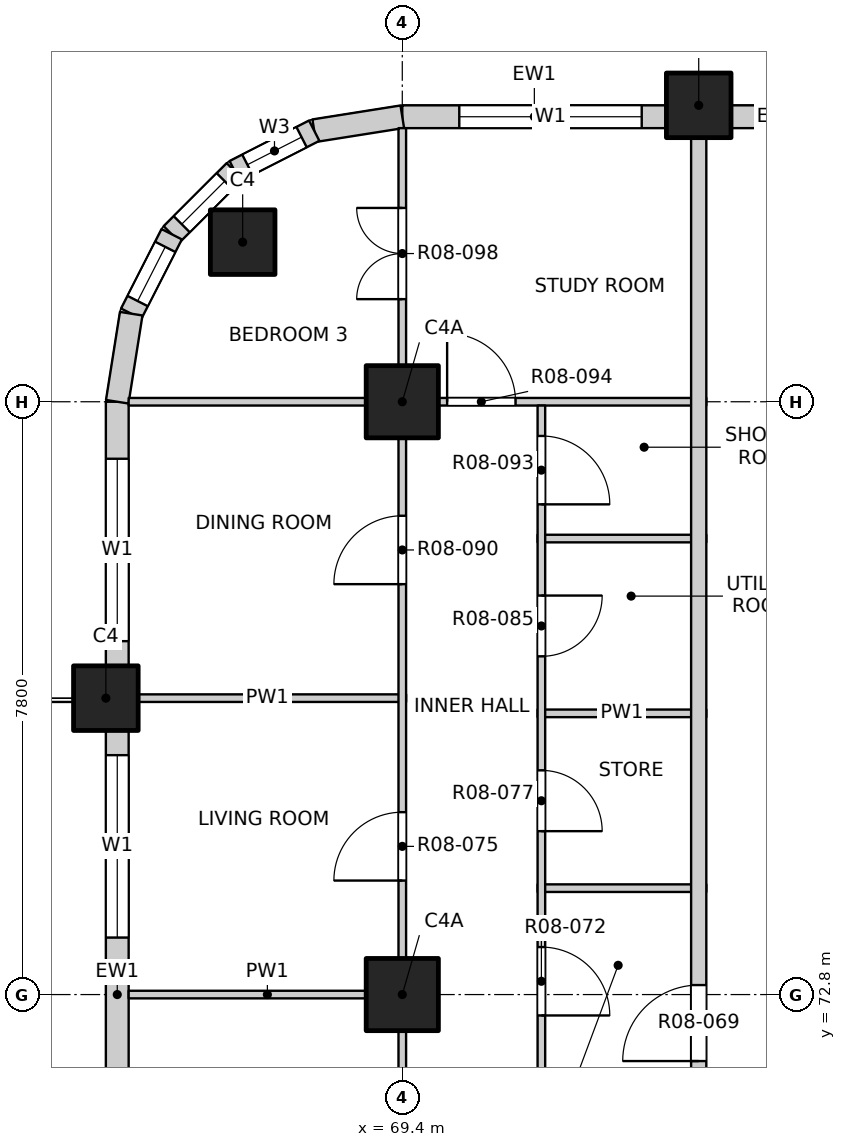
"""IFC4 building model, lengths in metres.
Left out: names, types, materials, properties, quantities, classifications, styles, units other than length and angle.
Written with IfcOpenShell. Run it as: python <this file> out.ifc"""

import sys

from ifc_helpers import new_model, si_unit, direction, frame, frame_2d, origin, origin_2d, place, context, subcontext, project, spatial, rectangle, extrude, element, fill, save


model = new_model("IFC4")
c1 = context("Model", 3, precision=1e-05, world=origin(), true_north=direction((0.0, 1.0)))
c2 = subcontext(c1, "Body", "Model", "MODEL_VIEW")
j1 = project(units=[si_unit("LENGTHUNIT", "METRE"), si_unit("PLANEANGLEUNIT", "RADIAN")], contexts=[c1])
p1 = place(None, origin())
s1 = spatial("IfcSite", under=j1, at=p1, CompositionType="ELEMENT")
p2 = place(p1, origin())
s2 = spatial("IfcBuilding", under=s1, at=p2, CompositionType="ELEMENT")
p3 = place(p2, frame((0.0, 0.0, 99.9)))
s3 = spatial("IfcBuildingStorey", under=s2, at=p3, CompositionType="ELEMENT", Elevation=99.9)
for number, where, z_axis, x_axis in (
    (1, (67.3, 82.7, -0.3), (0.0, 0.0, 1.0), (1.0, 0.0, 0.0)),
    (2, (73.3, 84.5, -0.3), (0.0, 0.0, 1.0), (1.0, 0.0, 0.0)),
    (3, (65.5, 76.7, -0.3), (0.0, 0.0, 1.0), (1.0, 0.0, 0.0)),
):
    element("IfcColumn", number, at=place(p3, frame(where, z_axis=z_axis, x_axis=x_axis)), inside=s3, PredefinedType="COLUMN", context=c2, shape_type="SweptSolid", body=[
        extrude(rectangle(XDim=0.85, YDim=0.85, at=origin_2d()), origin(), (0.0, 0.0, 1.0), 3.45),
    ])
for number, where, z_axis, x_axis in (
    (4, (69.4, 72.8, -0.3), (0.0, 0.0, 1.0), (1.0, 0.0, 0.0)),
    (5, (69.4, 80.6, -0.3), (0.0, 0.0, 1.0), (1.0, 0.0, 0.0)),
):
    element("IfcColumn", number, at=place(p3, frame(where, z_axis=z_axis, x_axis=x_axis)), inside=s3, PredefinedType="COLUMN", context=c2, shape_type="SweptSolid", body=[
        extrude(rectangle(XDim=0.95, YDim=0.95, at=origin_2d()), origin(), (0.0, 0.0, 1.0), 3.45),
    ])
p4 = place(p3, frame((69.4, 84.35, 0.0), z_axis=(0.0, 0.0, 1.0), x_axis=(1.0, 0.0, 0.0)))
e6 = element("IfcWall", 6, at=p4, inside=s3, PredefinedType="SOLIDWALL", context=c2, shape_type="SweptSolid", body=[
    extrude(rectangle(XDim=3.475, YDim=0.3, at=frame_2d((1.738, 0.0))), origin(), (0.0, 0.0, 1.0), 2.7),
])
p5 = place(p4, frame((0.75, 0.0, 0.9)))
e7 = element("IfcOpeningElement", 7, at=p5, cuts=e6, PredefinedType="OPENING", context=c2, shape_type="SweptSolid", body=[
    extrude(rectangle(XDim=2.4, YDim=1.8, at=frame_2d((1.2, 0.9))), frame((0.0, 0.16, 0.0), z_axis=(0.0, -1.0, 0.0), x_axis=(1.0, 0.0, 0.0)), (0.0, 0.0, 1.0), 0.32),
])
p6 = place(p3, frame((73.725, 84.35, 0.0), z_axis=(0.0, 0.0, 1.0), x_axis=(1.0, 0.0, 0.0)))
e8 = element("IfcWall", 8, at=p6, inside=s3, PredefinedType="SOLIDWALL", context=c2, shape_type="SweptSolid", body=[
    extrude(rectangle(XDim=1.25, YDim=0.3, at=frame_2d((0.625, 0.0))), origin(), (0.0, 0.0, 1.0), 2.7),
])
p7 = place(p3, frame((65.65, 69.325, 0.0), z_axis=(0.0, 0.0, 1.0), x_axis=(0.0, 1.0, 0.0)))
e9 = element("IfcWall", 9, at=p7, inside=s3, PredefinedType="SOLIDWALL", context=c2, shape_type="SweptSolid", body=[
    extrude(rectangle(XDim=6.95, YDim=0.3, at=frame_2d((3.475, 0.0))), origin(), (0.0, 0.0, 1.0), 2.7),
])
p8 = place(p7, frame((0.625, 0.0, 0.0)))
e10 = element("IfcOpeningElement", 10, at=p8, cuts=e9, PredefinedType="OPENING", context=c2, shape_type="SweptSolid", body=[
    extrude(rectangle(XDim=1.8, YDim=2.4, at=frame_2d((0.9, 1.2))), frame((0.0, 0.16, 0.0), z_axis=(0.0, -1.0, 0.0), x_axis=(1.0, 0.0, 0.0)), (0.0, 0.0, 1.0), 0.32),
])
p9 = place(p7, frame((4.225, 0.0, 0.9)))
e11 = element("IfcOpeningElement", 11, at=p9, cuts=e9, PredefinedType="OPENING", context=c2, shape_type="SweptSolid", body=[
    extrude(rectangle(XDim=2.4, YDim=1.8, at=frame_2d((1.2, 0.9))), frame((0.0, 0.16, 0.0), z_axis=(0.0, -1.0, 0.0), x_axis=(1.0, 0.0, 0.0)), (0.0, 0.0, 1.0), 0.32),
])
p10 = place(p3, frame((65.65, 77.125, 0.0), z_axis=(0.0, 0.0, 1.0), x_axis=(0.0, 1.0, 0.0)))
e12 = element("IfcWall", 12, at=p10, inside=s3, PredefinedType="SOLIDWALL", context=c2, shape_type="SweptSolid", body=[
    extrude(rectangle(XDim=3.475, YDim=0.3, at=frame_2d((1.738, 0.0))), origin(), (0.0, 0.0, 1.0), 2.7),
])
p11 = place(p10, frame((0.325, 0.0, 0.9)))
e13 = element("IfcOpeningElement", 13, at=p11, cuts=e12, PredefinedType="OPENING", context=c2, shape_type="SweptSolid", body=[
    extrude(rectangle(XDim=2.4, YDim=1.8, at=frame_2d((1.2, 0.9))), frame((0.0, 0.16, 0.0), z_axis=(0.0, -1.0, 0.0), x_axis=(1.0, 0.0, 0.0)), (0.0, 0.0, 1.0), 0.32),
])
p12 = place(p3, frame((69.4, 84.35, 0.0), z_axis=(0.0, 0.0, 1.0), x_axis=(-0.987678452879, -0.156496880861, 0.0)))
e14 = element("IfcWall", 14, at=p12, inside=s3, PredefinedType="SOLIDWALL", context=c2, shape_type="SweptSolid", body=[
    extrude(rectangle(XDim=1.173, YDim=0.3, at=frame_2d((0.586, 0.0))), origin(), (0.0, 0.0, 1.0), 2.7),
])
p13 = place(p3, frame((68.241, 84.167, 0.0), z_axis=(0.0, 0.0, 1.0), x_axis=(-0.890988677504, -0.454025524128, 0.0)))
e15 = element("IfcWall", 15, at=p13, inside=s3, PredefinedType="SOLIDWALL", context=c2, shape_type="SweptSolid", body=[
    extrude(rectangle(XDim=1.173, YDim=0.3, at=frame_2d((0.587, 0.0))), origin(), (0.0, 0.0, 1.0), 2.7),
])
p14 = place(p13, frame((0.187, 0.0, 0.9)))
e16 = element("IfcOpeningElement", 16, at=p14, cuts=e15, PredefinedType="OPENING", context=c2, shape_type="SweptSolid", body=[
    extrude(rectangle(XDim=0.8, YDim=1.2, at=frame_2d((0.4, 0.6))), frame((0.0, 0.16, 0.0), z_axis=(0.0, -1.0, 0.0), x_axis=(1.0, 0.0, 0.0)), (0.0, 0.0, 1.0), 0.32),
])
p15 = place(p3, frame((67.196, 83.634, 0.0), z_axis=(0.0, 0.0, 1.0), x_axis=(-0.707106781187, -0.707106781187, 0.0)))
e17 = element("IfcWall", 17, at=p15, inside=s3, PredefinedType="SOLIDWALL", context=c2, shape_type="SweptSolid", body=[
    extrude(rectangle(XDim=1.173, YDim=0.3, at=frame_2d((0.586, 0.0))), origin(), (0.0, 0.0, 1.0), 2.7),
])
p16 = place(p15, frame((0.187, 0.0, 0.9)))
e18 = element("IfcOpeningElement", 18, at=p16, cuts=e17, PredefinedType="OPENING", context=c2, shape_type="SweptSolid", body=[
    extrude(rectangle(XDim=0.8, YDim=1.2, at=frame_2d((0.4, 0.6))), frame((0.0, 0.16, 0.0), z_axis=(0.0, -1.0, 0.0), x_axis=(1.0, 0.0, 0.0)), (0.0, 0.0, 1.0), 0.32),
])
p17 = place(p3, frame((66.366, 82.804, 0.0), z_axis=(0.0, 0.0, 1.0), x_axis=(-0.454025524128, -0.890988677504, 0.0)))
e19 = element("IfcWall", 19, at=p17, inside=s3, PredefinedType="SOLIDWALL", context=c2, shape_type="SweptSolid", body=[
    extrude(rectangle(XDim=1.173, YDim=0.3, at=frame_2d((0.587, 0.0))), origin(), (0.0, 0.0, 1.0), 2.7),
])
p18 = place(p17, frame((0.187, 0.0, 0.9)))
e20 = element("IfcOpeningElement", 20, at=p18, cuts=e19, PredefinedType="OPENING", context=c2, shape_type="SweptSolid", body=[
    extrude(rectangle(XDim=0.8, YDim=1.2, at=frame_2d((0.4, 0.6))), frame((0.0, 0.16, 0.0), z_axis=(0.0, -1.0, 0.0), x_axis=(1.0, 0.0, 0.0)), (0.0, 0.0, 1.0), 0.32),
])
p19 = place(p3, frame((65.833, 81.759, 0.0), z_axis=(0.0, 0.0, 1.0), x_axis=(-0.156496880861, -0.987678452879, 0.0)))
e21 = element("IfcWall", 21, at=p19, inside=s3, PredefinedType="SOLIDWALL", context=c2, shape_type="SweptSolid", body=[
    extrude(rectangle(XDim=1.173, YDim=0.3, at=frame_2d((0.586, 0.0))), origin(), (0.0, 0.0, 1.0), 2.7),
])
p20 = place(p3, frame((65.8, 72.8, 0.0), z_axis=(0.0, 0.0, 1.0), x_axis=(1.0, 0.0, 0.0)))
e22 = element("IfcWall", 22, at=p20, inside=s3, PredefinedType="PARTITIONING", context=c2, shape_type="SweptSolid", body=[
    extrude(rectangle(XDim=3.65, YDim=0.1, at=frame_2d((1.825, 0.0))), origin(), (0.0, 0.0, 1.0), 3.15),
])
p21 = place(p3, frame((71.18, 74.2, 0.0), z_axis=(0.0, 0.0, 1.0), x_axis=(1.0, 0.0, 0.0)))
e23 = element("IfcWall", 23, at=p21, inside=s3, PredefinedType="PARTITIONING", context=c2, shape_type="SweptSolid", body=[
    extrude(rectangle(XDim=2.22, YDim=0.1, at=frame_2d((1.11, 0.0))), origin(), (0.0, 0.0, 1.0), 3.15),
])
p22 = place(p3, frame((71.18, 76.5, 0.0), z_axis=(0.0, 0.0, 1.0), x_axis=(1.0, 0.0, 0.0)))
e24 = element("IfcWall", 24, at=p22, inside=s3, PredefinedType="PARTITIONING", context=c2, shape_type="SweptSolid", body=[
    extrude(rectangle(XDim=2.22, YDim=0.1, at=frame_2d((1.11, 0.0))), origin(), (0.0, 0.0, 1.0), 2.55),
])
p23 = place(p3, frame((65.8, 76.7, 0.0), z_axis=(0.0, 0.0, 1.0), x_axis=(1.0, 0.0, 0.0)))
e25 = element("IfcWall", 25, at=p23, inside=s3, PredefinedType="PARTITIONING", context=c2, shape_type="SweptSolid", body=[
    extrude(rectangle(XDim=3.65, YDim=0.1, at=frame_2d((1.825, 0.0))), origin(), (0.0, 0.0, 1.0), 2.55),
])
p24 = place(p3, frame((71.18, 78.8, 0.0), z_axis=(0.0, 0.0, 1.0), x_axis=(1.0, 0.0, 0.0)))
e26 = element("IfcWall", 26, at=p24, inside=s3, PredefinedType="PARTITIONING", context=c2, shape_type="SweptSolid", body=[
    extrude(rectangle(XDim=2.22, YDim=0.1, at=frame_2d((1.11, 0.0))), origin(), (0.0, 0.0, 1.0), 3.15),
])
p25 = place(p3, frame((65.8, 80.6, 0.0), z_axis=(0.0, 0.0, 1.0), x_axis=(1.0, 0.0, 0.0)))
e27 = element("IfcWall", 27, at=p25, inside=s3, PredefinedType="PARTITIONING", context=c2, shape_type="SweptSolid", body=[
    extrude(rectangle(XDim=7.6, YDim=0.1, at=frame_2d((3.8, 0.0))), origin(), (0.0, 0.0, 1.0), 3.15),
])
p26 = place(p25, frame((4.19, 0.0, 0.0)))
e28 = element("IfcOpeningElement", 28, at=p26, cuts=e27, PredefinedType="OPENING", context=c2, shape_type="SweptSolid", body=[
    extrude(rectangle(XDim=0.9, YDim=2.1, at=frame_2d((0.45, 1.05))), frame((0.0, 0.06, 0.0), z_axis=(0.0, -1.0, 0.0), x_axis=(1.0, 0.0, 0.0)), (0.0, 0.0, 1.0), 0.12),
])
p27 = place(p3, frame((69.4, 45.8, 0.0), z_axis=(0.0, 0.0, 1.0), x_axis=(0.0, 1.0, 0.0)))
e29 = element("IfcWall", 29, at=p27, inside=s3, PredefinedType="PARTITIONING", context=c2, shape_type="SweptSolid", body=[
    extrude(rectangle(XDim=38.4, YDim=0.1, at=frame_2d((19.2, 0.0))), origin(), (0.0, 0.0, 1.0), 3.15),
])
p28 = place(p27, frame((1.05, 0.0, 0.0)))
e30 = element("IfcOpeningElement", 30, at=p28, cuts=e29, PredefinedType="OPENING", context=c2, shape_type="SweptSolid", body=[
    extrude(rectangle(XDim=1.2, YDim=2.1, at=frame_2d((0.6, 1.05))), frame((0.0, 0.06, 0.0), z_axis=(0.0, -1.0, 0.0), x_axis=(1.0, 0.0, 0.0)), (0.0, 0.0, 1.0), 0.12),
])
p29 = place(p27, frame((5.1, 0.0, 0.0)))
e31 = element("IfcOpeningElement", 31, at=p29, cuts=e29, PredefinedType="OPENING", context=c2, shape_type="SweptSolid", body=[
    extrude(rectangle(XDim=0.9, YDim=2.1, at=frame_2d((0.45, 1.05))), frame((0.0, 0.06, 0.0), z_axis=(0.0, -1.0, 0.0), x_axis=(1.0, 0.0, 0.0)), (0.0, 0.0, 1.0), 0.12),
])
p30 = place(p27, frame((9.0, 0.0, 0.0)))
e32 = element("IfcOpeningElement", 32, at=p30, cuts=e29, PredefinedType="OPENING", context=c2, shape_type="SweptSolid", body=[
    extrude(rectangle(XDim=0.9, YDim=2.1, at=frame_2d((0.45, 1.05))), frame((0.0, 0.06, 0.0), z_axis=(0.0, -1.0, 0.0), x_axis=(1.0, 0.0, 0.0)), (0.0, 0.0, 1.0), 0.12),
])
p31 = place(p27, frame((12.9, 0.0, 0.0)))
e33 = element("IfcOpeningElement", 33, at=p31, cuts=e29, PredefinedType="OPENING", context=c2, shape_type="SweptSolid", body=[
    extrude(rectangle(XDim=0.9, YDim=2.1, at=frame_2d((0.45, 1.05))), frame((0.0, 0.06, 0.0), z_axis=(0.0, -1.0, 0.0), x_axis=(1.0, 0.0, 0.0)), (0.0, 0.0, 1.0), 0.12),
])
p32 = place(p27, frame((16.8, 0.0, 0.0)))
e34 = element("IfcOpeningElement", 34, at=p32, cuts=e29, PredefinedType="OPENING", context=c2, shape_type="SweptSolid", body=[
    extrude(rectangle(XDim=0.9, YDim=2.1, at=frame_2d((0.45, 1.05))), frame((0.0, 0.06, 0.0), z_axis=(0.0, -1.0, 0.0), x_axis=(1.0, 0.0, 0.0)), (0.0, 0.0, 1.0), 0.12),
])
p33 = place(p27, frame((20.7, 0.0, 0.0)))
e35 = element("IfcOpeningElement", 35, at=p33, cuts=e29, PredefinedType="OPENING", context=c2, shape_type="SweptSolid", body=[
    extrude(rectangle(XDim=0.9, YDim=2.1, at=frame_2d((0.45, 1.05))), frame((0.0, 0.06, 0.0), z_axis=(0.0, -1.0, 0.0), x_axis=(1.0, 0.0, 0.0)), (0.0, 0.0, 1.0), 0.12),
])
p34 = place(p27, frame((24.6, 0.0, 0.0)))
e36 = element("IfcOpeningElement", 36, at=p34, cuts=e29, PredefinedType="OPENING", context=c2, shape_type="SweptSolid", body=[
    extrude(rectangle(XDim=0.9, YDim=2.1, at=frame_2d((0.45, 1.05))), frame((0.0, 0.06, 0.0), z_axis=(0.0, -1.0, 0.0), x_axis=(1.0, 0.0, 0.0)), (0.0, 0.0, 1.0), 0.12),
])
p35 = place(p27, frame((28.5, 0.0, 0.0)))
e37 = element("IfcOpeningElement", 37, at=p35, cuts=e29, PredefinedType="OPENING", context=c2, shape_type="SweptSolid", body=[
    extrude(rectangle(XDim=0.9, YDim=2.1, at=frame_2d((0.45, 1.05))), frame((0.0, 0.06, 0.0), z_axis=(0.0, -1.0, 0.0), x_axis=(1.0, 0.0, 0.0)), (0.0, 0.0, 1.0), 0.12),
])
p36 = place(p27, frame((32.4, 0.0, 0.0)))
e38 = element("IfcOpeningElement", 38, at=p36, cuts=e29, PredefinedType="OPENING", context=c2, shape_type="SweptSolid", body=[
    extrude(rectangle(XDim=0.9, YDim=2.1, at=frame_2d((0.45, 1.05))), frame((0.0, 0.06, 0.0), z_axis=(0.0, -1.0, 0.0), x_axis=(1.0, 0.0, 0.0)), (0.0, 0.0, 1.0), 0.12),
])
p37 = place(p27, frame((36.15, 0.0, 0.0)))
e39 = element("IfcOpeningElement", 39, at=p37, cuts=e29, PredefinedType="OPENING", context=c2, shape_type="SweptSolid", body=[
    extrude(rectangle(XDim=1.2, YDim=2.1, at=frame_2d((0.6, 1.05))), frame((0.0, 0.06, 0.0), z_axis=(0.0, -1.0, 0.0), x_axis=(1.0, 0.0, 0.0)), (0.0, 0.0, 1.0), 0.12),
])
p38 = place(p3, frame((71.23, 71.8, 0.0), z_axis=(0.0, 0.0, 1.0), x_axis=(0.0, 1.0, 0.0)))
e40 = element("IfcWall", 40, at=p38, inside=s3, PredefinedType="PARTITIONING", context=c2, shape_type="SweptSolid", body=[
    extrude(rectangle(XDim=8.75, YDim=0.1, at=frame_2d((4.375, 0.0))), origin(), (0.0, 0.0, 1.0), 3.15),
])
p39 = place(p38, frame((0.725, 0.0, 0.0)))
e41 = element("IfcOpeningElement", 41, at=p39, cuts=e40, PredefinedType="OPENING", context=c2, shape_type="SweptSolid", body=[
    extrude(rectangle(XDim=0.9, YDim=2.1, at=frame_2d((0.45, 1.05))), frame((0.0, 0.06, 0.0), z_axis=(0.0, -1.0, 0.0), x_axis=(1.0, 0.0, 0.0)), (0.0, 0.0, 1.0), 0.12),
])
p40 = place(p38, frame((3.15, 0.0, 0.0)))
e42 = element("IfcOpeningElement", 42, at=p40, cuts=e40, PredefinedType="OPENING", context=c2, shape_type="SweptSolid", body=[
    extrude(rectangle(XDim=0.8, YDim=2.1, at=frame_2d((0.4, 1.05))), frame((0.0, 0.06, 0.0), z_axis=(0.0, -1.0, 0.0), x_axis=(1.0, 0.0, 0.0)), (0.0, 0.0, 1.0), 0.12),
])
p41 = place(p38, frame((5.45, 0.0, 0.0)))
e43 = element("IfcOpeningElement", 43, at=p41, cuts=e40, PredefinedType="OPENING", context=c2, shape_type="SweptSolid", body=[
    extrude(rectangle(XDim=0.8, YDim=2.1, at=frame_2d((0.4, 1.05))), frame((0.0, 0.06, 0.0), z_axis=(0.0, -1.0, 0.0), x_axis=(1.0, 0.0, 0.0)), (0.0, 0.0, 1.0), 0.12),
])
p42 = place(p38, frame((7.45, 0.0, 0.0)))
e44 = element("IfcOpeningElement", 44, at=p42, cuts=e40, PredefinedType="OPENING", context=c2, shape_type="SweptSolid", body=[
    extrude(rectangle(XDim=0.9, YDim=2.1, at=frame_2d((0.45, 1.05))), frame((0.0, 0.06, 0.0), z_axis=(0.0, -1.0, 0.0), x_axis=(1.0, 0.0, 0.0)), (0.0, 0.0, 1.0), 0.12),
])
p43 = place(p3, frame((73.3, 53.4, 0.0), z_axis=(0.0, 0.0, 1.0), x_axis=(0.0, 1.0, 0.0)))
e45 = element("IfcWall", 45, at=p43, inside=s3, PredefinedType="PARTITIONING", context=c2, shape_type="SweptSolid", body=[
    extrude(rectangle(XDim=30.8, YDim=0.2, at=frame_2d((15.4, 0.0))), origin(), (0.0, 0.0, 1.0), 3.15),
])
p44 = place(p43, frame((6.425, 0.0, 0.0)))
e46 = element("IfcOpeningElement", 46, at=p44, cuts=e45, PredefinedType="OPENING", context=c2, shape_type="SweptSolid", body=[
    extrude(rectangle(XDim=1.0, YDim=2.1, at=frame_2d((0.5, 1.05))), frame((0.0, 0.11, 0.0), z_axis=(0.0, -1.0, 0.0), x_axis=(1.0, 0.0, 0.0)), (0.0, 0.0, 1.0), 0.22),
])
p45 = place(p43, frame((18.525, 0.0, 0.0)))
e47 = element("IfcOpeningElement", 47, at=p45, cuts=e45, PredefinedType="OPENING", context=c2, shape_type="SweptSolid", body=[
    extrude(rectangle(XDim=1.0, YDim=2.1, at=frame_2d((0.5, 1.05))), frame((0.0, 0.11, 0.0), z_axis=(0.0, -1.0, 0.0), x_axis=(1.0, 0.0, 0.0)), (0.0, 0.0, 1.0), 0.22),
])
p46 = place(p5, origin())
e48 = element("IfcWindow", 48, at=p46, inside=s3, PartitioningType="DOUBLE_PANEL_VERTICAL", PredefinedType="WINDOW", context=c2, shape_type="SweptSolid", body=[
    extrude(rectangle(XDim=2.4, YDim=1.8, at=frame_2d((1.2, 0.9))), frame((0.0, 0.03, 0.0), z_axis=(0.0, -1.0, 0.0), x_axis=(1.0, 0.0, 0.0)), (0.0, 0.0, 1.0), 0.06),
])
fill(e7, e48)
p47 = place(p9, origin())
e49 = element("IfcWindow", 49, at=p47, inside=s3, PartitioningType="DOUBLE_PANEL_VERTICAL", PredefinedType="WINDOW", context=c2, shape_type="SweptSolid", body=[
    extrude(rectangle(XDim=2.4, YDim=1.8, at=frame_2d((1.2, 0.9))), frame((0.0, 0.03, 0.0), z_axis=(0.0, -1.0, 0.0), x_axis=(1.0, 0.0, 0.0)), (0.0, 0.0, 1.0), 0.06),
])
fill(e11, e49)
p48 = place(p11, origin())
e50 = element("IfcWindow", 50, at=p48, inside=s3, PartitioningType="DOUBLE_PANEL_VERTICAL", PredefinedType="WINDOW", context=c2, shape_type="SweptSolid", body=[
    extrude(rectangle(XDim=2.4, YDim=1.8, at=frame_2d((1.2, 0.9))), frame((0.0, 0.03, 0.0), z_axis=(0.0, -1.0, 0.0), x_axis=(1.0, 0.0, 0.0)), (0.0, 0.0, 1.0), 0.06),
])
fill(e13, e50)
p49 = place(p14, origin())
e51 = element("IfcWindow", 51, at=p49, inside=s3, PartitioningType="SINGLE_PANEL", PredefinedType="WINDOW", context=c2, shape_type="SweptSolid", body=[
    extrude(rectangle(XDim=0.8, YDim=1.2, at=frame_2d((0.4, 0.6))), frame((0.0, 0.03, 0.0), z_axis=(0.0, -1.0, 0.0), x_axis=(1.0, 0.0, 0.0)), (0.0, 0.0, 1.0), 0.06),
])
fill(e16, e51)
p50 = place(p16, origin())
e52 = element("IfcWindow", 52, at=p50, inside=s3, PartitioningType="SINGLE_PANEL", PredefinedType="WINDOW", context=c2, shape_type="SweptSolid", body=[
    extrude(rectangle(XDim=0.8, YDim=1.2, at=frame_2d((0.4, 0.6))), frame((0.0, 0.03, 0.0), z_axis=(0.0, -1.0, 0.0), x_axis=(1.0, 0.0, 0.0)), (0.0, 0.0, 1.0), 0.06),
])
fill(e18, e52)
p51 = place(p18, origin())
e53 = element("IfcWindow", 53, at=p51, inside=s3, PartitioningType="SINGLE_PANEL", PredefinedType="WINDOW", context=c2, shape_type="SweptSolid", body=[
    extrude(rectangle(XDim=0.8, YDim=1.2, at=frame_2d((0.4, 0.6))), frame((0.0, 0.03, 0.0), z_axis=(0.0, -1.0, 0.0), x_axis=(1.0, 0.0, 0.0)), (0.0, 0.0, 1.0), 0.06),
])
fill(e20, e53)
p52 = place(p45, origin())
e54 = element("IfcDoor", 54, at=p52, inside=s3, OperationType="SINGLE_SWING_RIGHT", PredefinedType="DOOR", context=c2, shape_type="SweptSolid", body=[
    extrude(rectangle(XDim=1.0, YDim=2.1, at=frame_2d((0.5, 1.05))), frame((0.0, 0.025, 0.0), z_axis=(0.0, -1.0, 0.0), x_axis=(1.0, 0.0, 0.0)), (0.0, 0.0, 1.0), 0.05),
])
fill(e47, e54)
p53 = place(p39, origin())
e55 = element("IfcDoor", 55, at=p53, inside=s3, OperationType="SINGLE_SWING_RIGHT", PredefinedType="DOOR", context=c2, shape_type="SweptSolid", body=[
    extrude(rectangle(XDim=0.9, YDim=2.1, at=frame_2d((0.45, 1.05))), frame((0.0, 0.025, 0.0), z_axis=(0.0, -1.0, 0.0), x_axis=(1.0, 0.0, 0.0)), (0.0, 0.0, 1.0), 0.05),
])
fill(e41, e55)
p54 = place(p35, origin())
e56 = element("IfcDoor", 56, at=p54, inside=s3, OperationType="SINGLE_SWING_LEFT", PredefinedType="DOOR", context=c2, shape_type="SweptSolid", body=[
    extrude(rectangle(XDim=0.9, YDim=2.1, at=frame_2d((0.45, 1.05))), frame((0.0, 0.025, 0.0), z_axis=(0.0, -1.0, 0.0), x_axis=(1.0, 0.0, 0.0)), (0.0, 0.0, 1.0), 0.05),
])
fill(e37, e56)
p55 = place(p40, origin())
e57 = element("IfcDoor", 57, at=p55, inside=s3, OperationType="SINGLE_SWING_RIGHT", PredefinedType="DOOR", context=c2, shape_type="SweptSolid", body=[
    extrude(rectangle(XDim=0.8, YDim=2.1, at=frame_2d((0.4, 1.05))), frame((0.0, 0.025, 0.0), z_axis=(0.0, -1.0, 0.0), x_axis=(1.0, 0.0, 0.0)), (0.0, 0.0, 1.0), 0.05),
])
fill(e42, e57)
p56 = place(p41, origin())
e58 = element("IfcDoor", 58, at=p56, inside=s3, OperationType="SINGLE_SWING_LEFT", PredefinedType="DOOR", context=c2, shape_type="SweptSolid", body=[
    extrude(rectangle(XDim=0.8, YDim=2.1, at=frame_2d((0.4, 1.05))), frame((0.0, 0.025, 0.0), z_axis=(0.0, -1.0, 0.0), x_axis=(1.0, 0.0, 0.0)), (0.0, 0.0, 1.0), 0.05),
])
fill(e43, e58)
p57 = place(p36, origin())
e59 = element("IfcDoor", 59, at=p57, inside=s3, OperationType="SINGLE_SWING_LEFT", PredefinedType="DOOR", context=c2, shape_type="SweptSolid", body=[
    extrude(rectangle(XDim=0.9, YDim=2.1, at=frame_2d((0.45, 1.05))), frame((0.0, 0.025, 0.0), z_axis=(0.0, -1.0, 0.0), x_axis=(1.0, 0.0, 0.0)), (0.0, 0.0, 1.0), 0.05),
])
fill(e38, e59)
p58 = place(p42, origin())
e60 = element("IfcDoor", 60, at=p58, inside=s3, OperationType="SINGLE_SWING_RIGHT", PredefinedType="DOOR", context=c2, shape_type="SweptSolid", body=[
    extrude(rectangle(XDim=0.9, YDim=2.1, at=frame_2d((0.45, 1.05))), frame((0.0, 0.025, 0.0), z_axis=(0.0, -1.0, 0.0), x_axis=(1.0, 0.0, 0.0)), (0.0, 0.0, 1.0), 0.05),
])
fill(e44, e60)
p59 = place(p26, origin())
e61 = element("IfcDoor", 61, at=p59, inside=s3, OperationType="SINGLE_SWING_LEFT", PredefinedType="DOOR", context=c2, shape_type="SweptSolid", body=[
    extrude(rectangle(XDim=0.9, YDim=2.1, at=frame_2d((0.45, 1.05))), frame((0.0, 0.025, 0.0), z_axis=(0.0, -1.0, 0.0), x_axis=(1.0, 0.0, 0.0)), (0.0, 0.0, 1.0), 0.05),
])
fill(e28, e61)
p60 = place(p37, origin())
e62 = element("IfcDoor", 62, at=p60, inside=s3, OperationType="DOUBLE_DOOR_SINGLE_SWING", PredefinedType="DOOR", context=c2, shape_type="SweptSolid", body=[
    extrude(rectangle(XDim=1.2, YDim=2.1, at=frame_2d((0.6, 1.05))), frame((0.0, 0.025, 0.0), z_axis=(0.0, -1.0, 0.0), x_axis=(1.0, 0.0, 0.0)), (0.0, 0.0, 1.0), 0.05),
])
fill(e39, e62)
save(model, sys.argv[1])
